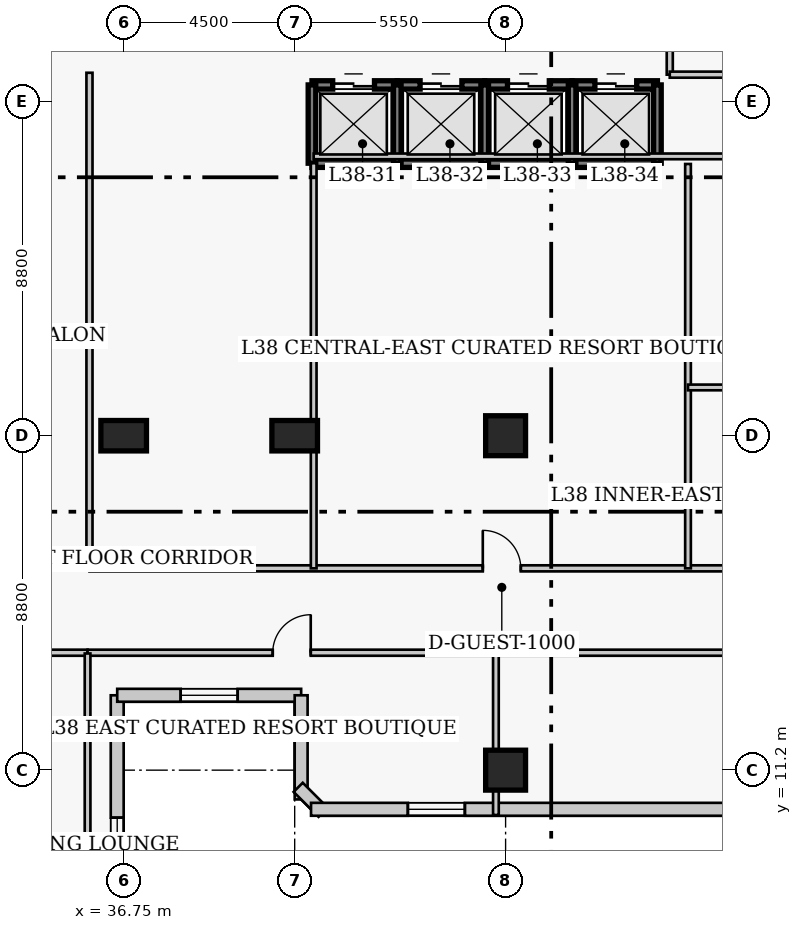
"""IFC4 building model, lengths in metres.
Left out: names, types, materials, properties, quantities, classifications, styles, units other than length and angle.
Written with IfcOpenShell. Run it as: python <this file> out.ifc"""

import sys

from ifc_helpers import new_model, si_unit, direction, frame, frame_2d, origin, origin_2d, place, context, subcontext, project, spatial, rectangle, extrude, element, fill, save


model = new_model("IFC4")
c1 = context("Model", 3, precision=1e-05, world=origin(), true_north=direction((0.0, 1.0)))
c2 = subcontext(c1, "Body", "Model", "MODEL_VIEW")
j1 = project(units=[si_unit("LENGTHUNIT", "METRE"), si_unit("PLANEANGLEUNIT", "RADIAN")], contexts=[c1])
p1 = place(None, origin())
s1 = spatial("IfcSite", under=j1, at=p1, CompositionType="ELEMENT")
p2 = place(p1, origin())
s2 = spatial("IfcBuilding", under=s1, at=p2, CompositionType="ELEMENT")
p3 = place(p2, frame((0.0, 0.0, 153.6)))
s3 = spatial("IfcBuildingStorey", under=s2, at=p3, CompositionType="ELEMENT", Elevation=153.6)
for number, where, z_axis, x_axis in (
    (1, (36.75, 20.0, 0.0), (0.0, 0.0, 1.0), (1.0, 0.0, 0.0)),
    (2, (41.25, 20.0, 0.0), (0.0, 0.0, 1.0), (1.0, 0.0, 0.0)),
):
    element("IfcColumn", number, at=place(p3, frame(where, z_axis=z_axis, x_axis=x_axis)), inside=s3, PredefinedType="COLUMN", context=c2, shape_type="SweptSolid", body=[
        extrude(rectangle(XDim=1.2, YDim=0.8, at=origin_2d()), origin(), (0.0, 0.0, 1.0), 3.8),
    ])
for number, where, z_axis, x_axis in (
    (3, (46.8, 11.2, 0.0), (0.0, 0.0, 1.0), (1.0, 0.0, 0.0)),
    (4, (46.8, 20.0, 0.0), (0.0, 0.0, 1.0), (1.0, 0.0, 0.0)),
):
    element("IfcColumn", number, at=place(p3, frame(where, z_axis=z_axis, x_axis=x_axis)), inside=s3, PredefinedType="COLUMN", context=c2, shape_type="SweptSolid", body=[
        extrude(rectangle(XDim=1.05, YDim=1.05, at=origin_2d()), origin(), (0.0, 0.0, 1.0), 3.8),
    ])
p4 = place(p3, frame((36.58, 5.23, 0.0), z_axis=(0.0, 0.0, 1.0), x_axis=(0.0, 1.0, 0.0)))
e5 = element("IfcWall", 5, at=p4, inside=s3, PredefinedType="SOLIDWALL", context=c2, shape_type="SweptSolid", body=[
    extrude(rectangle(XDim=7.94, YDim=0.34, at=frame_2d((3.97, 0.0))), origin(), (0.0, 0.0, 1.0), 3.55),
])
p5 = place(p4, frame((3.22, 0.0, 0.85)))
e6 = element("IfcOpeningElement", 6, at=p5, cuts=e5, PredefinedType="OPENING", context=c2, shape_type="SweptSolid", body=[
    extrude(rectangle(XDim=1.5, YDim=1.75, at=frame_2d((0.75, 0.875))), frame((0.0, 0.18, 0.0), z_axis=(0.0, -1.0, 0.0), x_axis=(1.0, 0.0, 0.0)), (0.0, 0.0, 1.0), 0.36),
])
p6 = place(p3, frame((36.58, 13.17, 0.0), z_axis=(0.0, 0.0, 1.0), x_axis=(1.0, 0.0, 0.0)))
e7 = element("IfcWall", 7, at=p6, inside=s3, PredefinedType="SOLIDWALL", context=c2, shape_type="SweptSolid", body=[
    extrude(rectangle(XDim=4.84, YDim=0.34, at=frame_2d((2.42, 0.0))), origin(), (0.0, 0.0, 1.0), 3.55),
])
p7 = place(p6, frame((1.67, 0.0, 0.85)))
e8 = element("IfcOpeningElement", 8, at=p7, cuts=e7, PredefinedType="OPENING", context=c2, shape_type="SweptSolid", body=[
    extrude(rectangle(XDim=1.5, YDim=1.75, at=frame_2d((0.75, 0.875))), frame((0.0, 0.18, 0.0), z_axis=(0.0, -1.0, 0.0), x_axis=(1.0, 0.0, 0.0)), (0.0, 0.0, 1.0), 0.36),
])
p8 = place(p3, frame((41.42, 13.17, 0.0), z_axis=(0.0, 0.0, 1.0), x_axis=(0.0, -1.0, 0.0)))
e9 = element("IfcWall", 9, at=p8, inside=s3, PredefinedType="SOLIDWALL", context=c2, shape_type="SweptSolid", body=[
    extrude(rectangle(XDim=2.74, YDim=0.34, at=frame_2d((1.37, 0.0))), origin(), (0.0, 0.0, 1.0), 3.55),
])
p9 = place(p3, frame((41.342, 10.749, 0.0), z_axis=(0.0, 0.0, 1.0), x_axis=(0.707106781187, -0.707106781187, 0.0)))
e10 = element("IfcWall", 10, at=p9, inside=s3, PredefinedType="SOLIDWALL", context=c2, shape_type="SweptSolid", body=[
    extrude(rectangle(XDim=0.929, YDim=0.34, at=frame_2d((0.464, 0.0))), origin(), (0.0, 0.0, 1.0), 3.55),
])
p10 = place(p3, frame((41.68, 10.17, 0.0), z_axis=(0.0, 0.0, 1.0), x_axis=(1.0, 0.0, 0.0)))
e11 = element("IfcWall", 11, at=p10, inside=s3, PredefinedType="SOLIDWALL", context=c2, shape_type="SweptSolid", body=[
    extrude(rectangle(XDim=26.69, YDim=0.34, at=frame_2d((13.345, 0.0))), origin(), (0.0, 0.0, 1.0), 3.55),
])
p11 = place(p10, frame((2.548, 0.0, 0.85)))
e12 = element("IfcOpeningElement", 12, at=p11, cuts=e11, PredefinedType="OPENING", context=c2, shape_type="SweptSolid", body=[
    extrude(rectangle(XDim=1.5, YDim=1.75, at=frame_2d((0.75, 0.875))), frame((0.0, 0.18, 0.0), z_axis=(0.0, -1.0, 0.0), x_axis=(1.0, 0.0, 0.0)), (0.0, 0.0, 1.0), 0.36),
])
p12 = place(p10, frame((13.745, 0.0, 0.85)))
e13 = element("IfcOpeningElement", 13, at=p12, cuts=e11, PredefinedType="OPENING", context=c2, shape_type="SweptSolid", body=[
    extrude(rectangle(XDim=1.5, YDim=1.75, at=frame_2d((0.75, 0.875))), frame((0.0, 0.18, 0.0), z_axis=(0.0, -1.0, 0.0), x_axis=(1.0, 0.0, 0.0)), (0.0, 0.0, 1.0), 0.36),
])
p13 = place(p10, frame((21.492, 0.0, 0.85)))
e14 = element("IfcOpeningElement", 14, at=p13, cuts=e11, PredefinedType="OPENING", context=c2, shape_type="SweptSolid", body=[
    extrude(rectangle(XDim=1.5, YDim=1.75, at=frame_2d((0.75, 0.875))), frame((0.0, 0.18, 0.0), z_axis=(0.0, -1.0, 0.0), x_axis=(1.0, 0.0, 0.0)), (0.0, 0.0, 1.0), 0.36),
])
p14 = place(p3, frame((41.705, 29.23, 0.0), z_axis=(0.0, 0.0, 1.0), x_axis=(1.0, 0.0, 0.0)))
e15 = element("IfcWall", 15, at=p14, inside=s3, PredefinedType="SHEAR", context=c2, shape_type="SweptSolid", body=[
    extrude(rectangle(XDim=2.245, YDim=0.22, at=frame_2d((1.123, 0.0))), origin(), (0.0, 0.0, 1.0), 3.8),
])
p15 = place(p14, frame((0.545, 0.0, 0.0)))
e16 = element("IfcOpeningElement", 16, at=p15, cuts=e15, PredefinedType="OPENING", context=c2, shape_type="SweptSolid", body=[
    extrude(rectangle(XDim=1.1, YDim=2.15, at=frame_2d((0.55, 1.075))), frame((0.0, 0.12, 0.0), z_axis=(0.0, -1.0, 0.0), x_axis=(1.0, 0.0, 0.0)), (0.0, 0.0, 1.0), 0.24),
])
p16 = place(p3, frame((41.705, 27.17, 0.0), z_axis=(0.0, 0.0, 1.0), x_axis=(1.0, 0.0, 0.0)))
e17 = element("IfcWall", 17, at=p16, inside=s3, PredefinedType="SHEAR", context=c2, shape_type="SweptSolid", body=[
    extrude(rectangle(XDim=2.245, YDim=0.22, at=frame_2d((1.123, 0.0))), origin(), (0.0, 0.0, 1.0), 3.8),
])
p17 = place(p3, frame((41.705, 27.17, 0.0), z_axis=(0.0, 0.0, 1.0), x_axis=(0.0, 1.0, 0.0)))
e18 = element("IfcWall", 18, at=p17, inside=s3, PredefinedType="SHEAR", context=c2, shape_type="SweptSolid", body=[
    extrude(rectangle(XDim=2.06, YDim=0.2, at=frame_2d((1.03, 0.0))), origin(), (0.0, 0.0, 1.0), 3.8),
])
p18 = place(p3, frame((43.95, 29.23, 0.0), z_axis=(0.0, 0.0, 1.0), x_axis=(1.0, 0.0, 0.0)))
e19 = element("IfcWall", 19, at=p18, inside=s3, PredefinedType="SHEAR", context=c2, shape_type="SweptSolid", body=[
    extrude(rectangle(XDim=2.3, YDim=0.22, at=frame_2d((1.15, 0.0))), origin(), (0.0, 0.0, 1.0), 3.8),
])
p19 = place(p18, frame((0.6, 0.0, 0.0)))
e20 = element("IfcOpeningElement", 20, at=p19, cuts=e19, PredefinedType="OPENING", context=c2, shape_type="SweptSolid", body=[
    extrude(rectangle(XDim=1.1, YDim=2.15, at=frame_2d((0.55, 1.075))), frame((0.0, 0.12, 0.0), z_axis=(0.0, -1.0, 0.0), x_axis=(1.0, 0.0, 0.0)), (0.0, 0.0, 1.0), 0.24),
])
p20 = place(p3, frame((43.95, 27.17, 0.0), z_axis=(0.0, 0.0, 1.0), x_axis=(1.0, 0.0, 0.0)))
e21 = element("IfcWall", 21, at=p20, inside=s3, PredefinedType="SHEAR", context=c2, shape_type="SweptSolid", body=[
    extrude(rectangle(XDim=2.3, YDim=0.22, at=frame_2d((1.15, 0.0))), origin(), (0.0, 0.0, 1.0), 3.8),
])
p21 = place(p3, frame((43.95, 27.17, 0.0), z_axis=(0.0, 0.0, 1.0), x_axis=(0.0, 1.0, 0.0)))
e22 = element("IfcWall", 22, at=p21, inside=s3, PredefinedType="SHEAR", context=c2, shape_type="SweptSolid", body=[
    extrude(rectangle(XDim=2.06, YDim=0.2, at=frame_2d((1.03, 0.0))), origin(), (0.0, 0.0, 1.0), 3.8),
])
p22 = place(p3, frame((46.25, 29.23, 0.0), z_axis=(0.0, 0.0, 1.0), x_axis=(1.0, 0.0, 0.0)))
e23 = element("IfcWall", 23, at=p22, inside=s3, PredefinedType="SHEAR", context=c2, shape_type="SweptSolid", body=[
    extrude(rectangle(XDim=2.3, YDim=0.22, at=frame_2d((1.15, 0.0))), origin(), (0.0, 0.0, 1.0), 3.8),
])
p23 = place(p22, frame((0.6, 0.0, 0.0)))
e24 = element("IfcOpeningElement", 24, at=p23, cuts=e23, PredefinedType="OPENING", context=c2, shape_type="SweptSolid", body=[
    extrude(rectangle(XDim=1.1, YDim=2.15, at=frame_2d((0.55, 1.075))), frame((0.0, 0.12, 0.0), z_axis=(0.0, -1.0, 0.0), x_axis=(1.0, 0.0, 0.0)), (0.0, 0.0, 1.0), 0.24),
])
p24 = place(p3, frame((46.25, 27.17, 0.0), z_axis=(0.0, 0.0, 1.0), x_axis=(1.0, 0.0, 0.0)))
e25 = element("IfcWall", 25, at=p24, inside=s3, PredefinedType="SHEAR", context=c2, shape_type="SweptSolid", body=[
    extrude(rectangle(XDim=2.3, YDim=0.22, at=frame_2d((1.15, 0.0))), origin(), (0.0, 0.0, 1.0), 3.8),
])
p25 = place(p3, frame((46.25, 27.17, 0.0), z_axis=(0.0, 0.0, 1.0), x_axis=(0.0, 1.0, 0.0)))
e26 = element("IfcWall", 26, at=p25, inside=s3, PredefinedType="SHEAR", context=c2, shape_type="SweptSolid", body=[
    extrude(rectangle(XDim=2.06, YDim=0.2, at=frame_2d((1.03, 0.0))), origin(), (0.0, 0.0, 1.0), 3.8),
])
p26 = place(p3, frame((48.55, 29.23, 0.0), z_axis=(0.0, 0.0, 1.0), x_axis=(1.0, 0.0, 0.0)))
e27 = element("IfcWall", 27, at=p26, inside=s3, PredefinedType="SHEAR", context=c2, shape_type="SweptSolid", body=[
    extrude(rectangle(XDim=2.245, YDim=0.22, at=frame_2d((1.123, 0.0))), origin(), (0.0, 0.0, 1.0), 3.8),
])
p27 = place(p26, frame((0.6, 0.0, 0.0)))
e28 = element("IfcOpeningElement", 28, at=p27, cuts=e27, PredefinedType="OPENING", context=c2, shape_type="SweptSolid", body=[
    extrude(rectangle(XDim=1.1, YDim=2.15, at=frame_2d((0.55, 1.075))), frame((0.0, 0.12, 0.0), z_axis=(0.0, -1.0, 0.0), x_axis=(1.0, 0.0, 0.0)), (0.0, 0.0, 1.0), 0.24),
])
p28 = place(p3, frame((48.55, 27.17, 0.0), z_axis=(0.0, 0.0, 1.0), x_axis=(1.0, 0.0, 0.0)))
e29 = element("IfcWall", 29, at=p28, inside=s3, PredefinedType="SHEAR", context=c2, shape_type="SweptSolid", body=[
    extrude(rectangle(XDim=2.245, YDim=0.22, at=frame_2d((1.123, 0.0))), origin(), (0.0, 0.0, 1.0), 3.8),
])
for number, where, z_axis, x_axis in (
    (30, (48.55, 27.17, 0.0), (0.0, 0.0, 1.0), (0.0, 1.0, 0.0)),
    (31, (50.795, 27.17, 0.0), (0.0, 0.0, 1.0), (0.0, 1.0, 0.0)),
):
    element("IfcWall", number, at=place(p3, frame(where, z_axis=z_axis, x_axis=x_axis)), inside=s3, PredefinedType="SHEAR", context=c2, shape_type="SweptSolid", body=[
        extrude(rectangle(XDim=2.06, YDim=0.2, at=frame_2d((1.03, 0.0))), origin(), (0.0, 0.0, 1.0), 3.8),
    ])
p29 = place(p3, frame((51.12, 29.5, 0.0), z_axis=(0.0, 0.0, 1.0), x_axis=(0.0, 1.0, 0.0)))
e32 = element("IfcWall", 32, at=p29, inside=s3, PredefinedType="PARTITIONING", context=c2, shape_type="SweptSolid", body=[
    extrude(rectangle(XDim=3.7, YDim=0.16, at=frame_2d((1.85, 0.0))), origin(), (0.0, 0.0, 1.0), 3.55),
])
p30 = place(p29, frame((0.9, 0.0, 0.0)))
e33 = element("IfcOpeningElement", 33, at=p30, cuts=e32, PredefinedType="OPENING", context=c2, shape_type="SweptSolid", body=[
    extrude(rectangle(XDim=1.1, YDim=2.15, at=frame_2d((0.55, 1.075))), frame((0.0, 0.09, 0.0), z_axis=(0.0, -1.0, 0.0), x_axis=(1.0, 0.0, 0.0)), (0.0, 0.0, 1.0), 0.18),
])
p31 = place(p3, frame((51.12, 29.5, 0.0), z_axis=(0.0, 0.0, 1.0), x_axis=(1.0, 0.0, 0.0)))
e34 = element("IfcWall", 34, at=p31, inside=s3, PredefinedType="PARTITIONING", context=c2, shape_type="SweptSolid", body=[
    extrude(rectangle(XDim=5.63, YDim=0.16, at=frame_2d((2.815, 0.0))), origin(), (0.0, 0.0, 1.0), 3.55),
])
p32 = place(p3, frame((35.85, 16.51, 0.0), z_axis=(0.0, 0.0, 1.0), x_axis=(1.0, 0.0, 0.0)))
e35 = element("IfcWall", 35, at=p32, inside=s3, PredefinedType="PARTITIONING", context=c2, shape_type="SweptSolid", body=[
    extrude(rectangle(XDim=22.6, YDim=0.16, at=frame_2d((11.3, 0.0))), origin(), (0.0, 0.0, 1.0), 3.55),
])
p33 = place(p32, frame((10.35, 0.0, 0.0)))
e36 = element("IfcOpeningElement", 36, at=p33, cuts=e35, PredefinedType="OPENING", context=c2, shape_type="SweptSolid", body=[
    extrude(rectangle(XDim=1.0, YDim=2.15, at=frame_2d((0.5, 1.075))), frame((0.0, 0.09, 0.0), z_axis=(0.0, -1.0, 0.0), x_axis=(1.0, 0.0, 0.0)), (0.0, 0.0, 1.0), 0.18),
])
p34 = place(p32, frame((18.65, 0.0, 0.0)))
e37 = element("IfcOpeningElement", 37, at=p34, cuts=e35, PredefinedType="OPENING", context=c2, shape_type="SweptSolid", body=[
    extrude(rectangle(XDim=1.0, YDim=2.15, at=frame_2d((0.5, 1.075))), frame((0.0, 0.09, 0.0), z_axis=(0.0, -1.0, 0.0), x_axis=(1.0, 0.0, 0.0)), (0.0, 0.0, 1.0), 0.18),
])
p35 = place(p3, frame((35.85, 16.51, 0.0), z_axis=(0.0, 0.0, 1.0), x_axis=(0.0, 1.0, 0.0)))
e38 = element("IfcWall", 38, at=p35, inside=s3, PredefinedType="PARTITIONING", context=c2, shape_type="SweptSolid", body=[
    extrude(rectangle(XDim=13.04, YDim=0.16, at=frame_2d((6.52, 0.0))), origin(), (0.0, 0.0, 1.0), 3.55),
])
p36 = place(p3, frame((19.35, 14.29, 0.0), z_axis=(0.0, 0.0, 1.0), x_axis=(1.0, 0.0, 0.0)))
e39 = element("IfcWall", 39, at=p36, inside=s3, PredefinedType="PARTITIONING", context=c2, shape_type="SweptSolid", body=[
    extrude(rectangle(XDim=16.45, YDim=0.16, at=frame_2d((8.225, 0.0))), origin(), (0.0, 0.0, 1.0), 3.55),
])
p37 = place(p36, frame((3.24, 0.0, 0.0)))
e40 = element("IfcOpeningElement", 40, at=p37, cuts=e39, PredefinedType="OPENING", context=c2, shape_type="SweptSolid", body=[
    extrude(rectangle(XDim=1.0, YDim=2.15, at=frame_2d((0.5, 1.075))), frame((0.0, 0.09, 0.0), z_axis=(0.0, -1.0, 0.0), x_axis=(1.0, 0.0, 0.0)), (0.0, 0.0, 1.0), 0.18),
])
p38 = place(p36, frame((6.005, 0.0, 0.0)))
e41 = element("IfcOpeningElement", 41, at=p38, cuts=e39, PredefinedType="OPENING", context=c2, shape_type="SweptSolid", body=[
    extrude(rectangle(XDim=0.95, YDim=2.1, at=frame_2d((0.475, 1.05))), frame((0.0, 0.09, 0.0), z_axis=(0.0, -1.0, 0.0), x_axis=(1.0, 0.0, 0.0)), (0.0, 0.0, 1.0), 0.18),
])
p39 = place(p36, frame((12.805, 0.0, 0.0)))
e42 = element("IfcOpeningElement", 42, at=p39, cuts=e39, PredefinedType="OPENING", context=c2, shape_type="SweptSolid", body=[
    extrude(rectangle(XDim=1.0, YDim=2.15, at=frame_2d((0.5, 1.075))), frame((0.0, 0.09, 0.0), z_axis=(0.0, -1.0, 0.0), x_axis=(1.0, 0.0, 0.0)), (0.0, 0.0, 1.0), 0.18),
])
p40 = place(p3, frame((35.8, 14.29, 0.0), z_axis=(0.0, 0.0, 1.0), x_axis=(1.0, 0.0, 0.0)))
e43 = element("IfcWall", 43, at=p40, inside=s3, PredefinedType="PARTITIONING", context=c2, shape_type="SweptSolid", body=[
    extrude(rectangle(XDim=22.65, YDim=0.16, at=frame_2d((11.325, 0.0))), origin(), (0.0, 0.0, 1.0), 3.55),
])
p41 = place(p40, frame((4.873, 0.0, 0.0)))
e44 = element("IfcOpeningElement", 44, at=p41, cuts=e43, PredefinedType="OPENING", context=c2, shape_type="SweptSolid", body=[
    extrude(rectangle(XDim=1.0, YDim=2.15, at=frame_2d((0.5, 1.075))), frame((0.0, 0.09, 0.0), z_axis=(0.0, -1.0, 0.0), x_axis=(1.0, 0.0, 0.0)), (0.0, 0.0, 1.0), 0.18),
])
p42 = place(p3, frame((41.75, 16.51, 0.0), z_axis=(0.0, 0.0, 1.0), x_axis=(0.0, 1.0, 0.0)))
e45 = element("IfcWall", 45, at=p42, inside=s3, PredefinedType="PARTITIONING", context=c2, shape_type="SweptSolid", body=[
    extrude(rectangle(XDim=10.66, YDim=0.15, at=frame_2d((5.33, 0.0))), origin(), (0.0, 0.0, 1.0), 3.55),
])
p43 = place(p3, frame((51.6, 16.51, 0.0), z_axis=(0.0, 0.0, 1.0), x_axis=(0.0, 1.0, 0.0)))
e46 = element("IfcWall", 46, at=p43, inside=s3, PredefinedType="PARTITIONING", context=c2, shape_type="SweptSolid", body=[
    extrude(rectangle(XDim=10.64, YDim=0.15, at=frame_2d((5.32, 0.0))), origin(), (0.0, 0.0, 1.0), 3.55),
])
p44 = place(p3, frame((41.75, 27.35, 0.0), z_axis=(0.0, 0.0, 1.0), x_axis=(1.0, 0.0, 0.0)))
e47 = element("IfcWall", 47, at=p44, inside=s3, PredefinedType="PARTITIONING", context=c2, shape_type="SweptSolid", body=[
    extrude(rectangle(XDim=16.64, YDim=0.15, at=frame_2d((8.32, 0.0))), origin(), (0.0, 0.0, 1.0), 3.55),
])
p45 = place(p3, frame((51.6, 21.27, 0.0), z_axis=(0.0, 0.0, 1.0), x_axis=(1.0, 0.0, 0.0)))
e48 = element("IfcWall", 48, at=p45, inside=s3, PredefinedType="PARTITIONING", context=c2, shape_type="SweptSolid", body=[
    extrude(rectangle(XDim=6.79, YDim=0.15, at=frame_2d((3.395, 0.0))), origin(), (0.0, 0.0, 1.0), 3.55),
])
p46 = place(p3, frame((35.8, 4.82, 0.0), z_axis=(0.0, 0.0, 1.0), x_axis=(0.0, 1.0, 0.0)))
e49 = element("IfcWall", 49, at=p46, inside=s3, PredefinedType="PARTITIONING", context=c2, shape_type="SweptSolid", body=[
    extrude(rectangle(XDim=9.45, YDim=0.15, at=frame_2d((4.725, 0.0))), origin(), (0.0, 0.0, 1.0), 3.55),
])
p47 = place(p3, frame((46.545, 10.02, 0.0), z_axis=(0.0, 0.0, 1.0), x_axis=(0.0, 1.0, 0.0)))
e50 = element("IfcWall", 50, at=p47, inside=s3, PredefinedType="PARTITIONING", context=c2, shape_type="SweptSolid", body=[
    extrude(rectangle(XDim=4.27, YDim=0.15, at=frame_2d((2.135, 0.0))), origin(), (0.0, 0.0, 1.0), 2.9),
])
p48 = place(p5, origin())
e51 = element("IfcWindow", 51, at=p48, inside=s3, PartitioningType="SINGLE_PANEL", PredefinedType="WINDOW", context=c2, shape_type="SweptSolid", body=[
    extrude(rectangle(XDim=1.5, YDim=1.75, at=frame_2d((0.75, 0.875))), frame((0.0, 0.03, 0.0), z_axis=(0.0, -1.0, 0.0), x_axis=(1.0, 0.0, 0.0)), (0.0, 0.0, 1.0), 0.06),
])
fill(e6, e51)
p49 = place(p7, origin())
e52 = element("IfcWindow", 52, at=p49, inside=s3, PartitioningType="SINGLE_PANEL", PredefinedType="WINDOW", context=c2, shape_type="SweptSolid", body=[
    extrude(rectangle(XDim=1.5, YDim=1.75, at=frame_2d((0.75, 0.875))), frame((0.0, 0.03, 0.0), z_axis=(0.0, -1.0, 0.0), x_axis=(1.0, 0.0, 0.0)), (0.0, 0.0, 1.0), 0.06),
])
fill(e8, e52)
p50 = place(p11, origin())
e53 = element("IfcWindow", 53, at=p50, inside=s3, PartitioningType="SINGLE_PANEL", PredefinedType="WINDOW", context=c2, shape_type="SweptSolid", body=[
    extrude(rectangle(XDim=1.5, YDim=1.75, at=frame_2d((0.75, 0.875))), frame((0.0, 0.03, 0.0), z_axis=(0.0, -1.0, 0.0), x_axis=(1.0, 0.0, 0.0)), (0.0, 0.0, 1.0), 0.06),
])
fill(e12, e53)
p51 = place(p15, origin())
e54 = element("IfcDoor", 54, at=p51, inside=s3, OperationType="DOUBLE_DOOR_SLIDING", PredefinedType="DOOR", context=c2, shape_type="SweptSolid", body=[
    extrude(rectangle(XDim=1.1, YDim=2.15, at=frame_2d((0.55, 1.075))), frame((0.0, 0.025, 0.0), z_axis=(0.0, -1.0, 0.0), x_axis=(1.0, 0.0, 0.0)), (0.0, 0.0, 1.0), 0.05),
])
fill(e16, e54)
p52 = place(p19, origin())
e55 = element("IfcDoor", 55, at=p52, inside=s3, OperationType="DOUBLE_DOOR_SLIDING", PredefinedType="DOOR", context=c2, shape_type="SweptSolid", body=[
    extrude(rectangle(XDim=1.1, YDim=2.15, at=frame_2d((0.55, 1.075))), frame((0.0, 0.025, 0.0), z_axis=(0.0, -1.0, 0.0), x_axis=(1.0, 0.0, 0.0)), (0.0, 0.0, 1.0), 0.05),
])
fill(e20, e55)
p53 = place(p23, origin())
e56 = element("IfcDoor", 56, at=p53, inside=s3, OperationType="DOUBLE_DOOR_SLIDING", PredefinedType="DOOR", context=c2, shape_type="SweptSolid", body=[
    extrude(rectangle(XDim=1.1, YDim=2.15, at=frame_2d((0.55, 1.075))), frame((0.0, 0.025, 0.0), z_axis=(0.0, -1.0, 0.0), x_axis=(1.0, 0.0, 0.0)), (0.0, 0.0, 1.0), 0.05),
])
fill(e24, e56)
p54 = place(p27, origin())
e57 = element("IfcDoor", 57, at=p54, inside=s3, OperationType="DOUBLE_DOOR_SLIDING", PredefinedType="DOOR", context=c2, shape_type="SweptSolid", body=[
    extrude(rectangle(XDim=1.1, YDim=2.15, at=frame_2d((0.55, 1.075))), frame((0.0, 0.025, 0.0), z_axis=(0.0, -1.0, 0.0), x_axis=(1.0, 0.0, 0.0)), (0.0, 0.0, 1.0), 0.05),
])
fill(e28, e57)
p55 = place(p33, origin())
e58 = element("IfcDoor", 58, at=p55, inside=s3, OperationType="SINGLE_SWING_LEFT", PredefinedType="DOOR", context=c2, shape_type="SweptSolid", body=[
    extrude(rectangle(XDim=1.0, YDim=2.15, at=frame_2d((0.5, 1.075))), frame((0.0, 0.025, 0.0), z_axis=(0.0, -1.0, 0.0), x_axis=(1.0, 0.0, 0.0)), (0.0, 0.0, 1.0), 0.05),
])
fill(e36, e58)
p56 = place(p41, origin())
e59 = element("IfcDoor", 59, at=p56, inside=s3, OperationType="SINGLE_SWING_RIGHT", PredefinedType="DOOR", context=c2, shape_type="SweptSolid", body=[
    extrude(rectangle(XDim=1.0, YDim=2.15, at=frame_2d((0.5, 1.075))), frame((0.0, 0.025, 0.0), z_axis=(0.0, -1.0, 0.0), x_axis=(1.0, 0.0, 0.0)), (0.0, 0.0, 1.0), 0.05),
])
fill(e44, e59)
save(model, sys.argv[1])
